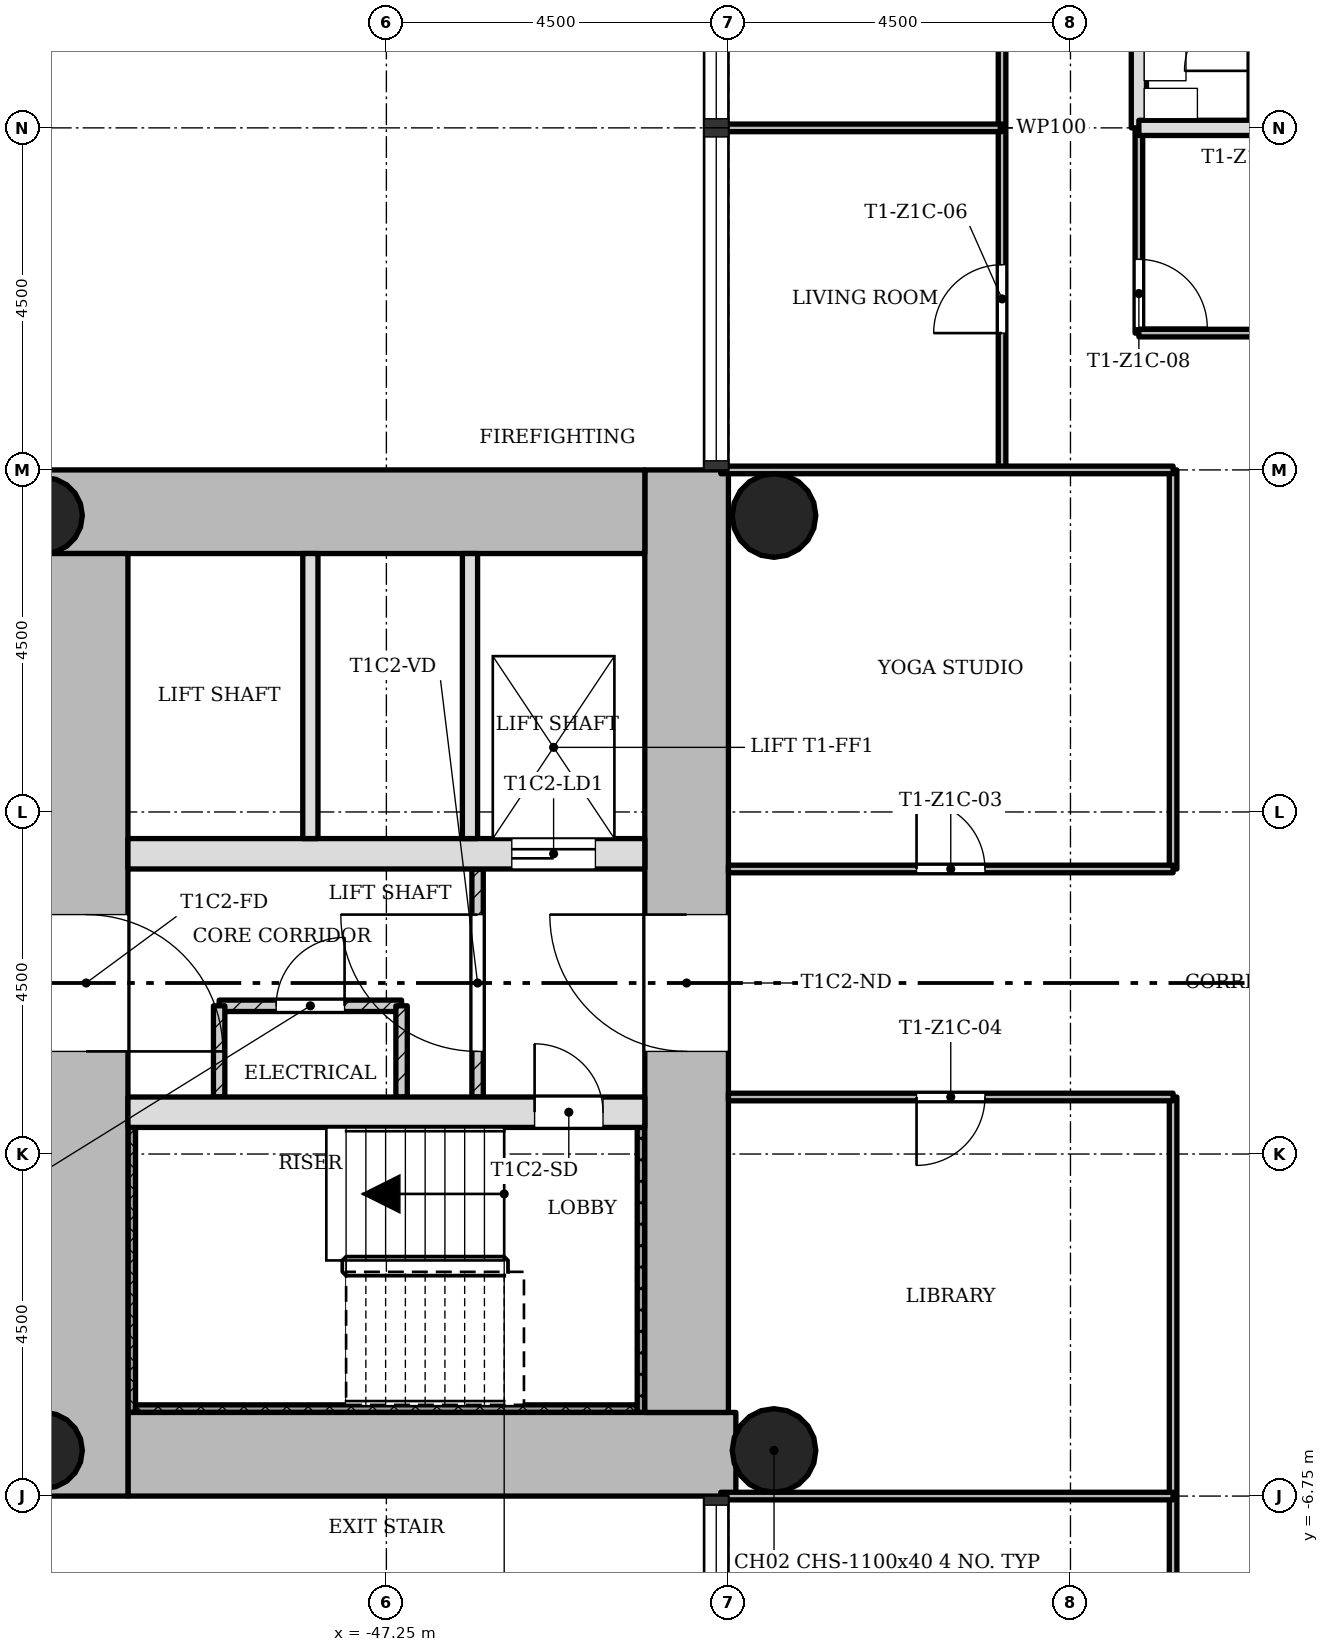
"""IFC4 building model, lengths in metres.
Left out: names, types, materials, properties, quantities, classifications, styles, units other than length and angle.
Written with IfcOpenShell. Run it as: python <this file> out.ifc"""

import sys

from ifc_helpers import new_model, si_unit, direction, frame, frame_2d, origin, origin_2d, place, context, subcontext, project, spatial, rectangle, hollow_circle, extrude, element, fill, save


model = new_model("IFC4")
c1 = context("Model", 3, precision=1e-05, world=origin(), true_north=direction((0.0, 1.0)))
c2 = subcontext(c1, "Body", "Model", "MODEL_VIEW")
j1 = project(units=[si_unit("LENGTHUNIT", "METRE"), si_unit("PLANEANGLEUNIT", "RADIAN")], contexts=[c1])
p1 = place(None, origin())
s1 = spatial("IfcSite", under=j1, at=p1, CompositionType="ELEMENT")
p2 = place(p1, origin())
s2 = spatial("IfcBuilding", under=s1, at=p2, CompositionType="ELEMENT")
p3 = place(p2, frame((0.0, 0.0, 48.3)))
s3 = spatial("IfcBuildingStorey", under=s2, at=p3, CompositionType="ELEMENT", Elevation=48.3)
p4 = place(p3, frame((-50.65, -6.2, 0.0), z_axis=(0.0, 0.0, 1.0), x_axis=(1.0, 0.0, 0.0)))
e1 = element("IfcWall", 1, at=p4, inside=s3, PredefinedType="SHEAR", context=c2, shape_type="SweptSolid", body=[
    extrude(rectangle(XDim=7.998, YDim=1.1, at=frame_2d((3.999, 0.0))), origin(), (0.0, 0.0, 1.0), 3.4),
])
p5 = place(p3, frame((-43.3, -5.65, 0.0), z_axis=(0.0, 0.0, 1.0), x_axis=(0.0, 1.0, 0.0)))
e2 = element("IfcWall", 2, at=p5, inside=s3, PredefinedType="SHEAR", context=c2, shape_type="SweptSolid", body=[
    extrude(rectangle(XDim=12.4, YDim=1.1, at=frame_2d((6.2, 0.0))), origin(), (0.0, 0.0, 1.0), 3.4),
])
p6 = place(p5, frame((4.75, 0.0, 0.0)))
e3 = element("IfcOpeningElement", 3, at=p6, cuts=e2, PredefinedType="OPENING", context=c2, shape_type="SweptSolid", body=[
    extrude(rectangle(XDim=1.8, YDim=2.1, at=frame_2d((0.9, 1.05))), frame((0.0, 0.56, 0.0), z_axis=(0.0, -1.0, 0.0), x_axis=(1.0, 0.0, 0.0)), (0.0, 0.0, 1.0), 1.12),
])
p7 = place(p3, frame((-43.85, 6.2, 0.0), z_axis=(0.0, 0.0, 1.0), x_axis=(-1.0, 0.0, 0.0)))
e4 = element("IfcWall", 4, at=p7, inside=s3, PredefinedType="SHEAR", context=c2, shape_type="SweptSolid", body=[
    extrude(rectangle(XDim=7.9, YDim=1.1, at=frame_2d((3.95, 0.0))), origin(), (0.0, 0.0, 1.0), 3.4),
])
p8 = place(p3, frame((-51.2, 5.65, 0.0), z_axis=(0.0, 0.0, 1.0), x_axis=(0.0, -1.0, 0.0)))
e5 = element("IfcWall", 5, at=p8, inside=s3, PredefinedType="SHEAR", context=c2, shape_type="SweptSolid", body=[
    extrude(rectangle(XDim=12.4, YDim=1.1, at=frame_2d((6.2, 0.0))), origin(), (0.0, 0.0, 1.0), 3.4),
])
p9 = place(p8, frame((4.75, 0.0, 0.0)))
e6 = element("IfcOpeningElement", 6, at=p9, cuts=e5, PredefinedType="OPENING", context=c2, shape_type="SweptSolid", body=[
    extrude(rectangle(XDim=1.8, YDim=2.1, at=frame_2d((0.9, 1.05))), frame((0.0, 0.56, 0.0), z_axis=(0.0, -1.0, 0.0), x_axis=(1.0, 0.0, 0.0)), (0.0, 0.0, 1.0), 1.12),
])
p10 = place(p3, frame((-50.65, -1.7, 0.0), z_axis=(0.0, 0.0, 1.0), x_axis=(1.0, 0.0, 0.0)))
e7 = element("IfcWall", 7, at=p10, inside=s3, PredefinedType="SHEAR", context=c2, shape_type="SweptSolid", body=[
    extrude(rectangle(XDim=6.8, YDim=0.4, at=frame_2d((3.4, 0.0))), origin(), (0.0, 0.0, 1.0), 3.4),
])
p11 = place(p10, frame((5.35, 0.0, 0.0)))
e8 = element("IfcOpeningElement", 8, at=p11, cuts=e7, PredefinedType="OPENING", context=c2, shape_type="SweptSolid", body=[
    extrude(rectangle(XDim=0.9, YDim=2.1, at=frame_2d((0.45, 1.05))), frame((0.0, 0.21, 0.0), z_axis=(0.0, -1.0, 0.0), x_axis=(1.0, 0.0, 0.0)), (0.0, 0.0, 1.0), 0.42),
])
p12 = place(p3, frame((-50.65, 1.7, 0.0), z_axis=(0.0, 0.0, 1.0), x_axis=(1.0, 0.0, 0.0)))
e9 = element("IfcWall", 9, at=p12, inside=s3, PredefinedType="SHEAR", context=c2, shape_type="SweptSolid", body=[
    extrude(rectangle(XDim=6.8, YDim=0.4, at=frame_2d((3.4, 0.0))), origin(), (0.0, 0.0, 1.0), 3.4),
])
p13 = place(p12, frame((5.05, 0.0, 0.0)))
e10 = element("IfcOpeningElement", 10, at=p13, cuts=e9, PredefinedType="OPENING", context=c2, shape_type="SweptSolid", body=[
    extrude(rectangle(XDim=1.1, YDim=2.1, at=frame_2d((0.55, 1.05))), frame((0.0, 0.21, 0.0), z_axis=(0.0, -1.0, 0.0), x_axis=(1.0, 0.0, 0.0)), (0.0, 0.0, 1.0), 0.42),
])
for number, where, z_axis, x_axis in (
    (11, (-51.75, -6.15, 0.0), (0.0, 0.0, 1.0), (1.0, 0.0, 0.0)),
    (12, (-51.75, 6.15, 0.0), (0.0, 0.0, 1.0), (1.0, 0.0, 0.0)),
):
    element("IfcColumn", number, at=place(p3, frame(where, z_axis=z_axis, x_axis=x_axis)), inside=s3, PredefinedType="COLUMN", context=c2, shape_type="SweptSolid", body=[
        extrude(hollow_circle(Radius=0.5, WallThickness=0.036, at=origin_2d()), origin(), (0.0, 0.0, 1.0), 3.4),
    ])
for number, where, z_axis, x_axis in (
    (13, (-42.15, -6.15, 0.0), (0.0, 0.0, 1.0), (1.0, 0.0, 0.0)),
    (14, (-42.15, 6.15, 0.0), (0.0, 0.0, 1.0), (1.0, 0.0, 0.0)),
):
    element("IfcColumn", number, at=place(p3, frame(where, z_axis=z_axis, x_axis=x_axis)), inside=s3, PredefinedType="COLUMN", context=c2, shape_type="SweptSolid", body=[
        extrude(hollow_circle(Radius=0.55, WallThickness=0.04, at=origin_2d()), origin(), (0.0, 0.0, 1.0), 3.4),
    ])
p14 = place(p3, frame((-46.05, 1.5, 0.0), z_axis=(0.0, 0.0, 1.0), x_axis=(0.0, -1.0, 0.0)))
e15 = element("IfcWall", 15, at=p14, inside=s3, PredefinedType="PARTITIONING", context=c2, shape_type="SweptSolid", body=[
    extrude(rectangle(XDim=3.0, YDim=0.15, at=frame_2d((1.5, 0.0))), origin(), (0.0, 0.0, 1.0), 3.0),
])
p15 = place(p14, frame((0.6, 0.0, 0.0)))
e16 = element("IfcOpeningElement", 16, at=p15, cuts=e15, PredefinedType="OPENING", context=c2, shape_type="SweptSolid", body=[
    extrude(rectangle(XDim=1.8, YDim=2.1, at=frame_2d((0.9, 1.05))), frame((0.0, 0.085, 0.0), z_axis=(0.0, -1.0, 0.0), x_axis=(1.0, 0.0, 0.0)), (0.0, 0.0, 1.0), 0.17),
])
for number, where, z_axis, x_axis in (
    (17, (-46.15, 5.65, 0.0), (0.0, 0.0, 1.0), (0.0, -1.0, 0.0)),
    (18, (-48.25, 5.65, 0.0), (0.0, 0.0, 1.0), (0.0, -1.0, 0.0)),
):
    element("IfcWall", number, at=place(p3, frame(where, z_axis=z_axis, x_axis=x_axis)), inside=s3, PredefinedType="SOLIDWALL", context=c2, shape_type="SweptSolid", body=[
        extrude(rectangle(XDim=3.75, YDim=0.2, at=frame_2d((1.875, 0.0))), origin(), (0.0, 0.0, 1.0), 3.0),
    ])
p16 = place(p3, frame((-47.05, -0.3, 0.0), z_axis=(0.0, 0.0, 1.0), x_axis=(-1.0, 0.0, 0.0)))
e19 = element("IfcWall", 19, at=p16, inside=s3, PredefinedType="PARTITIONING", context=c2, shape_type="SweptSolid", body=[
    extrude(rectangle(XDim=2.4, YDim=0.15, at=frame_2d((1.2, 0.0))), origin(), (0.0, 0.0, 1.0), 3.0),
])
p17 = place(p16, frame((0.75, 0.0, 0.0)))
e20 = element("IfcOpeningElement", 20, at=p17, cuts=e19, PredefinedType="OPENING", context=c2, shape_type="SweptSolid", body=[
    extrude(rectangle(XDim=0.9, YDim=2.1, at=frame_2d((0.45, 1.05))), frame((0.0, 0.085, 0.0), z_axis=(0.0, -1.0, 0.0), x_axis=(1.0, 0.0, 0.0)), (0.0, 0.0, 1.0), 0.17),
])
for number, where, z_axis, x_axis in (
    (21, (-47.05, -0.3, 0.0), (0.0, 0.0, 1.0), (0.0, -1.0, 0.0)),
    (22, (-49.45, -0.3, 0.0), (0.0, 0.0, 1.0), (0.0, -1.0, 0.0)),
):
    element("IfcWall", number, at=place(p3, frame(where, z_axis=z_axis, x_axis=x_axis)), inside=s3, PredefinedType="PARTITIONING", context=c2, shape_type="SweptSolid", body=[
        extrude(rectangle(XDim=1.2, YDim=0.15, at=frame_2d((0.6, 0.0))), origin(), (0.0, 0.0, 1.0), 3.0),
    ])
p18 = place(p3, frame((-39.15, 6.75, 0.0), z_axis=(0.0, 0.0, 1.0), x_axis=(0.0, 1.0, 0.0)))
e23 = element("IfcWall", 23, at=p18, inside=s3, PredefinedType="PARTITIONING", context=c2, shape_type="SweptSolid", body=[
    extrude(rectangle(XDim=9.0, YDim=0.1, at=frame_2d((4.5, 0.0))), origin(), (0.0, 0.0, 1.0), 3.0),
])
p19 = place(p18, frame((1.8, 0.0, 0.0)))
e24 = element("IfcOpeningElement", 24, at=p19, cuts=e23, PredefinedType="OPENING", context=c2, shape_type="SweptSolid", body=[
    extrude(rectangle(XDim=0.9, YDim=2.1, at=frame_2d((0.45, 1.05))), frame((0.0, 0.06, 0.0), z_axis=(0.0, -1.0, 0.0), x_axis=(1.0, 0.0, 0.0)), (0.0, 0.0, 1.0), 0.12),
])
p20 = place(p18, frame((6.3, 0.0, 0.0)))
e25 = element("IfcOpeningElement", 25, at=p20, cuts=e23, PredefinedType="OPENING", context=c2, shape_type="SweptSolid", body=[
    extrude(rectangle(XDim=0.9, YDim=2.1, at=frame_2d((0.45, 1.05))), frame((0.0, 0.06, 0.0), z_axis=(0.0, -1.0, 0.0), x_axis=(1.0, 0.0, 0.0)), (0.0, 0.0, 1.0), 0.12),
])
p21 = place(p3, frame((-37.35, 8.55, 0.0), z_axis=(0.0, 0.0, 1.0), x_axis=(0.0, 1.0, 0.0)))
e26 = element("IfcWall", 26, at=p21, inside=s3, PredefinedType="PARTITIONING", context=c2, shape_type="SweptSolid", body=[
    extrude(rectangle(XDim=2.7, YDim=0.1, at=frame_2d((1.35, 0.0))), origin(), (0.0, 0.0, 1.0), 3.0),
])
p22 = place(p21, frame((0.07, 0.0, 0.0)))
e27 = element("IfcOpeningElement", 27, at=p22, cuts=e26, PredefinedType="OPENING", context=c2, shape_type="SweptSolid", body=[
    extrude(rectangle(XDim=0.9, YDim=2.1, at=frame_2d((0.45, 1.05))), frame((0.0, 0.06, 0.0), z_axis=(0.0, -1.0, 0.0), x_axis=(1.0, 0.0, 0.0)), (0.0, 0.0, 1.0), 0.12),
])
p23 = place(p3, frame((-37.35, 11.25, 0.0), z_axis=(0.0, 0.0, 1.0), x_axis=(0.0, 1.0, 0.0)))
e28 = element("IfcWall", 28, at=p23, inside=s3, PredefinedType="SOLIDWALL", context=c2, shape_type="SweptSolid", body=[
    extrude(rectangle(XDim=4.5, YDim=0.2, at=frame_2d((2.25, 0.0))), origin(), (0.0, 0.0, 1.0), 3.0),
])
p24 = place(p23, frame((3.0, 0.0, 0.0)))
e29 = element("IfcOpeningElement", 29, at=p24, cuts=e28, PredefinedType="OPENING", context=c2, shape_type="SweptSolid", body=[
    extrude(rectangle(XDim=0.9, YDim=2.1, at=frame_2d((0.45, 1.05))), frame((0.0, 0.11, 0.0), z_axis=(0.0, -1.0, 0.0), x_axis=(1.0, 0.0, 0.0)), (0.0, 0.0, 1.0), 0.22),
])
p25 = place(p3, frame((-36.9, -8.55, 0.0), z_axis=(0.0, 0.0, 1.0), x_axis=(0.0, 1.0, 0.0)))
e30 = element("IfcWall", 30, at=p25, inside=s3, PredefinedType="PARTITIONING", context=c2, shape_type="SweptSolid", body=[
    extrude(rectangle(XDim=7.05, YDim=0.1, at=frame_2d((3.525, 0.0))), origin(), (0.0, 0.0, 1.0), 3.0),
])
p26 = place(p3, frame((-36.9, 1.5, 0.0), z_axis=(0.0, 0.0, 1.0), x_axis=(0.0, 1.0, 0.0)))
e31 = element("IfcWall", 31, at=p26, inside=s3, PredefinedType="PARTITIONING", context=c2, shape_type="SweptSolid", body=[
    extrude(rectangle(XDim=5.25, YDim=0.1, at=frame_2d((2.625, 0.0))), origin(), (0.0, 0.0, 1.0), 3.0),
])
p27 = place(p3, frame((-35.85, 11.25, 0.0), z_axis=(0.0, 0.0, 1.0), x_axis=(0.0, 1.0, 0.0)))
e32 = element("IfcWall", 32, at=p27, inside=s3, PredefinedType="PARTITIONING", context=c2, shape_type="SweptSolid", body=[
    extrude(rectangle(XDim=2.4, YDim=0.1, at=frame_2d((1.2, 0.0))), origin(), (0.0, 0.0, 1.0), 3.0),
])
p28 = place(p27, frame((0.75, 0.0, 0.0)))
e33 = element("IfcOpeningElement", 33, at=p28, cuts=e32, PredefinedType="OPENING", context=c2, shape_type="SweptSolid", body=[
    extrude(rectangle(XDim=0.9, YDim=2.1, at=frame_2d((0.45, 1.05))), frame((0.0, 0.06, 0.0), z_axis=(0.0, -1.0, 0.0), x_axis=(1.0, 0.0, 0.0)), (0.0, 0.0, 1.0), 0.12),
])
p29 = place(p3, frame((-42.85, -6.75, 0.0), z_axis=(0.0, 0.0, 1.0), x_axis=(1.0, 0.0, 0.0)))
e34 = element("IfcWall", 34, at=p29, inside=s3, PredefinedType="PARTITIONING", context=c2, shape_type="SweptSolid", body=[
    extrude(rectangle(XDim=5.95, YDim=0.1, at=frame_2d((2.975, 0.0))), origin(), (0.0, 0.0, 1.0), 3.0),
])
p30 = place(p3, frame((-42.75, -1.5, 0.0), z_axis=(0.0, 0.0, 1.0), x_axis=(1.0, 0.0, 0.0)))
e35 = element("IfcWall", 35, at=p30, inside=s3, PredefinedType="PARTITIONING", context=c2, shape_type="SweptSolid", body=[
    extrude(rectangle(XDim=5.85, YDim=0.1, at=frame_2d((2.925, 0.0))), origin(), (0.0, 0.0, 1.0), 3.0),
])
p31 = place(p30, frame((2.475, 0.0, 0.0)))
e36 = element("IfcOpeningElement", 36, at=p31, cuts=e35, PredefinedType="OPENING", context=c2, shape_type="SweptSolid", body=[
    extrude(rectangle(XDim=0.9, YDim=2.1, at=frame_2d((0.45, 1.05))), frame((0.0, 0.06, 0.0), z_axis=(0.0, -1.0, 0.0), x_axis=(1.0, 0.0, 0.0)), (0.0, 0.0, 1.0), 0.12),
])
p32 = place(p3, frame((-42.75, 1.5, 0.0), z_axis=(0.0, 0.0, 1.0), x_axis=(1.0, 0.0, 0.0)))
e37 = element("IfcWall", 37, at=p32, inside=s3, PredefinedType="PARTITIONING", context=c2, shape_type="SweptSolid", body=[
    extrude(rectangle(XDim=5.85, YDim=0.1, at=frame_2d((2.925, 0.0))), origin(), (0.0, 0.0, 1.0), 3.0),
])
p33 = place(p32, frame((2.475, 0.0, 0.0)))
e38 = element("IfcOpeningElement", 38, at=p33, cuts=e37, PredefinedType="OPENING", context=c2, shape_type="SweptSolid", body=[
    extrude(rectangle(XDim=0.9, YDim=2.1, at=frame_2d((0.45, 1.05))), frame((0.0, 0.06, 0.0), z_axis=(0.0, -1.0, 0.0), x_axis=(1.0, 0.0, 0.0)), (0.0, 0.0, 1.0), 0.12),
])
p34 = place(p3, frame((-42.85, 6.75, 0.0), z_axis=(0.0, 0.0, 1.0), x_axis=(1.0, 0.0, 0.0)))
e39 = element("IfcWall", 39, at=p34, inside=s3, PredefinedType="PARTITIONING", context=c2, shape_type="SweptSolid", body=[
    extrude(rectangle(XDim=5.95, YDim=0.1, at=frame_2d((2.975, 0.0))), origin(), (0.0, 0.0, 1.0), 3.0),
])
p35 = place(p3, frame((-37.35, 8.55, 0.0), z_axis=(0.0, 0.0, 1.0), x_axis=(1.0, 0.0, 0.0)))
e40 = element("IfcWall", 40, at=p35, inside=s3, PredefinedType="PARTITIONING", context=c2, shape_type="SweptSolid", body=[
    extrude(rectangle(XDim=2.25, YDim=0.1, at=frame_2d((1.125, 0.0))), origin(), (0.0, 0.0, 1.0), 3.0),
])
p36 = place(p3, frame((-42.85, 11.25, 0.0), z_axis=(0.0, 0.0, 1.0), x_axis=(1.0, 0.0, 0.0)))
e41 = element("IfcWall", 41, at=p36, inside=s3, PredefinedType="PARTITIONING", context=c2, shape_type="SweptSolid", body=[
    extrude(rectangle(XDim=3.7, YDim=0.1, at=frame_2d((1.85, 0.0))), origin(), (0.0, 0.0, 1.0), 3.0),
])
p37 = place(p3, frame((-37.35, 11.25, 0.0), z_axis=(0.0, 0.0, 1.0), x_axis=(1.0, 0.0, 0.0)))
e42 = element("IfcWall", 42, at=p37, inside=s3, PredefinedType="SOLIDWALL", context=c2, shape_type="SweptSolid", body=[
    extrude(rectangle(XDim=8.2, YDim=0.2, at=frame_2d((4.1, 0.0))), origin(), (0.0, 0.0, 1.0), 3.0),
])
p38 = place(p3, frame((-50.6, -1.9, 0.0), z_axis=(0.0, 0.0, 1.0), x_axis=(0.0, -1.0, 0.0)))
e43 = element("IfcWall", 43, at=p38, inside=s3, PredefinedType="SHEAR", context=c2, shape_type="SweptSolid", body=[
    extrude(rectangle(XDim=3.75, YDim=0.1, at=frame_2d((1.875, 0.0))), origin(), (0.0, 0.0, 1.0), 3.4),
])
p39 = place(p3, frame((-43.95, -5.6, 0.0), z_axis=(0.0, 0.0, 1.0), x_axis=(-1.0, 0.0, 0.0)))
e44 = element("IfcWall", 44, at=p39, inside=s3, PredefinedType="SHEAR", context=c2, shape_type="SweptSolid", body=[
    extrude(rectangle(XDim=6.6, YDim=0.1, at=frame_2d((3.3, 0.0))), origin(), (0.0, 0.0, 1.0), 3.4),
])
p40 = place(p3, frame((-43.9, -1.9, 0.0), z_axis=(0.0, 0.0, 1.0), x_axis=(0.0, -1.0, 0.0)))
e45 = element("IfcWall", 45, at=p40, inside=s3, PredefinedType="SHEAR", context=c2, shape_type="SweptSolid", body=[
    extrude(rectangle(XDim=3.75, YDim=0.1, at=frame_2d((1.875, 0.0))), origin(), (0.0, 0.0, 1.0), 3.4),
])
p41 = place(p15, origin())
e46 = element("IfcDoor", 46, at=p41, inside=s3, OperationType="SINGLE_SWING_LEFT", PredefinedType="DOOR", context=c2, shape_type="SweptSolid", body=[
    extrude(rectangle(XDim=1.8, YDim=2.1, at=frame_2d((0.9, 1.05))), frame((0.0, 0.025, 0.0), z_axis=(0.0, -1.0, 0.0), x_axis=(1.0, 0.0, 0.0)), (0.0, 0.0, 1.0), 0.05),
])
fill(e16, e46)
p42 = place(p17, origin())
e47 = element("IfcDoor", 47, at=p42, inside=s3, OperationType="SINGLE_SWING_LEFT", PredefinedType="DOOR", context=c2, shape_type="SweptSolid", body=[
    extrude(rectangle(XDim=0.9, YDim=2.1, at=frame_2d((0.45, 1.05))), frame((0.0, 0.025, 0.0), z_axis=(0.0, -1.0, 0.0), x_axis=(1.0, 0.0, 0.0)), (0.0, 0.0, 1.0), 0.05),
])
fill(e20, e47)
p43 = place(p33, origin())
e48 = element("IfcDoor", 48, at=p43, inside=s3, OperationType="SINGLE_SWING_RIGHT", PredefinedType="DOOR", context=c2, shape_type="SweptSolid", body=[
    extrude(rectangle(XDim=0.9, YDim=2.1, at=frame_2d((0.45, 1.05))), frame((0.0, 0.025, 0.0), z_axis=(0.0, -1.0, 0.0), x_axis=(1.0, 0.0, 0.0)), (0.0, 0.0, 1.0), 0.05),
])
fill(e38, e48)
p44 = place(p31, origin())
e49 = element("IfcDoor", 49, at=p44, inside=s3, OperationType="SINGLE_SWING_LEFT", PredefinedType="DOOR", context=c2, shape_type="SweptSolid", body=[
    extrude(rectangle(XDim=0.9, YDim=2.1, at=frame_2d((0.45, 1.05))), frame((0.0, 0.025, 0.0), z_axis=(0.0, -1.0, 0.0), x_axis=(1.0, 0.0, 0.0)), (0.0, 0.0, 1.0), 0.05),
])
fill(e36, e49)
p45 = place(p19, origin())
e50 = element("IfcDoor", 50, at=p45, inside=s3, OperationType="SINGLE_SWING_RIGHT", PredefinedType="DOOR", context=c2, shape_type="SweptSolid", body=[
    extrude(rectangle(XDim=0.9, YDim=2.1, at=frame_2d((0.45, 1.05))), frame((0.0, 0.025, 0.0), z_axis=(0.0, -1.0, 0.0), x_axis=(1.0, 0.0, 0.0)), (0.0, 0.0, 1.0), 0.05),
])
fill(e24, e50)
p46 = place(p22, origin())
e51 = element("IfcDoor", 51, at=p46, inside=s3, OperationType="SINGLE_SWING_LEFT", PredefinedType="DOOR", context=c2, shape_type="SweptSolid", body=[
    extrude(rectangle(XDim=0.9, YDim=2.1, at=frame_2d((0.45, 1.05))), frame((0.0, 0.025, 0.0), z_axis=(0.0, -1.0, 0.0), x_axis=(1.0, 0.0, 0.0)), (0.0, 0.0, 1.0), 0.05),
])
fill(e27, e51)
p47 = place(p11, origin())
e52 = element("IfcDoor", 52, at=p47, inside=s3, OperationType="SINGLE_SWING_RIGHT", PredefinedType="DOOR", context=c2, shape_type="SweptSolid", body=[
    extrude(rectangle(XDim=0.9, YDim=2.1, at=frame_2d((0.45, 1.05))), frame((0.0, 0.025, 0.0), z_axis=(0.0, -1.0, 0.0), x_axis=(1.0, 0.0, 0.0)), (0.0, 0.0, 1.0), 0.05),
])
fill(e8, e52)
p48 = place(p13, origin())
e53 = element("IfcDoor", 53, at=p48, inside=s3, OperationType="SLIDING_TO_LEFT", PredefinedType="DOOR", context=c2, shape_type="SweptSolid", body=[
    extrude(rectangle(XDim=1.1, YDim=2.1, at=frame_2d((0.55, 1.05))), frame((0.0, 0.025, 0.0), z_axis=(0.0, -1.0, 0.0), x_axis=(1.0, 0.0, 0.0)), (0.0, 0.0, 1.0), 0.05),
])
fill(e10, e53)
p49 = place(p6, origin())
e54 = element("IfcDoor", 54, at=p49, inside=s3, OperationType="SINGLE_SWING_LEFT", PredefinedType="DOOR", context=c2, shape_type="SweptSolid", body=[
    extrude(rectangle(XDim=1.8, YDim=2.1, at=frame_2d((0.9, 1.05))), frame((0.0, 0.025, 0.0), z_axis=(0.0, -1.0, 0.0), x_axis=(1.0, 0.0, 0.0)), (0.0, 0.0, 1.0), 0.05),
])
fill(e3, e54)
p50 = place(p9, origin())
e55 = element("IfcDoor", 55, at=p50, inside=s3, OperationType="SINGLE_SWING_LEFT", PredefinedType="DOOR", context=c2, shape_type="SweptSolid", body=[
    extrude(rectangle(XDim=1.8, YDim=2.1, at=frame_2d((0.9, 1.05))), frame((0.0, 0.025, 0.0), z_axis=(0.0, -1.0, 0.0), x_axis=(1.0, 0.0, 0.0)), (0.0, 0.0, 1.0), 0.05),
])
fill(e6, e55)
save(model, sys.argv[1])
